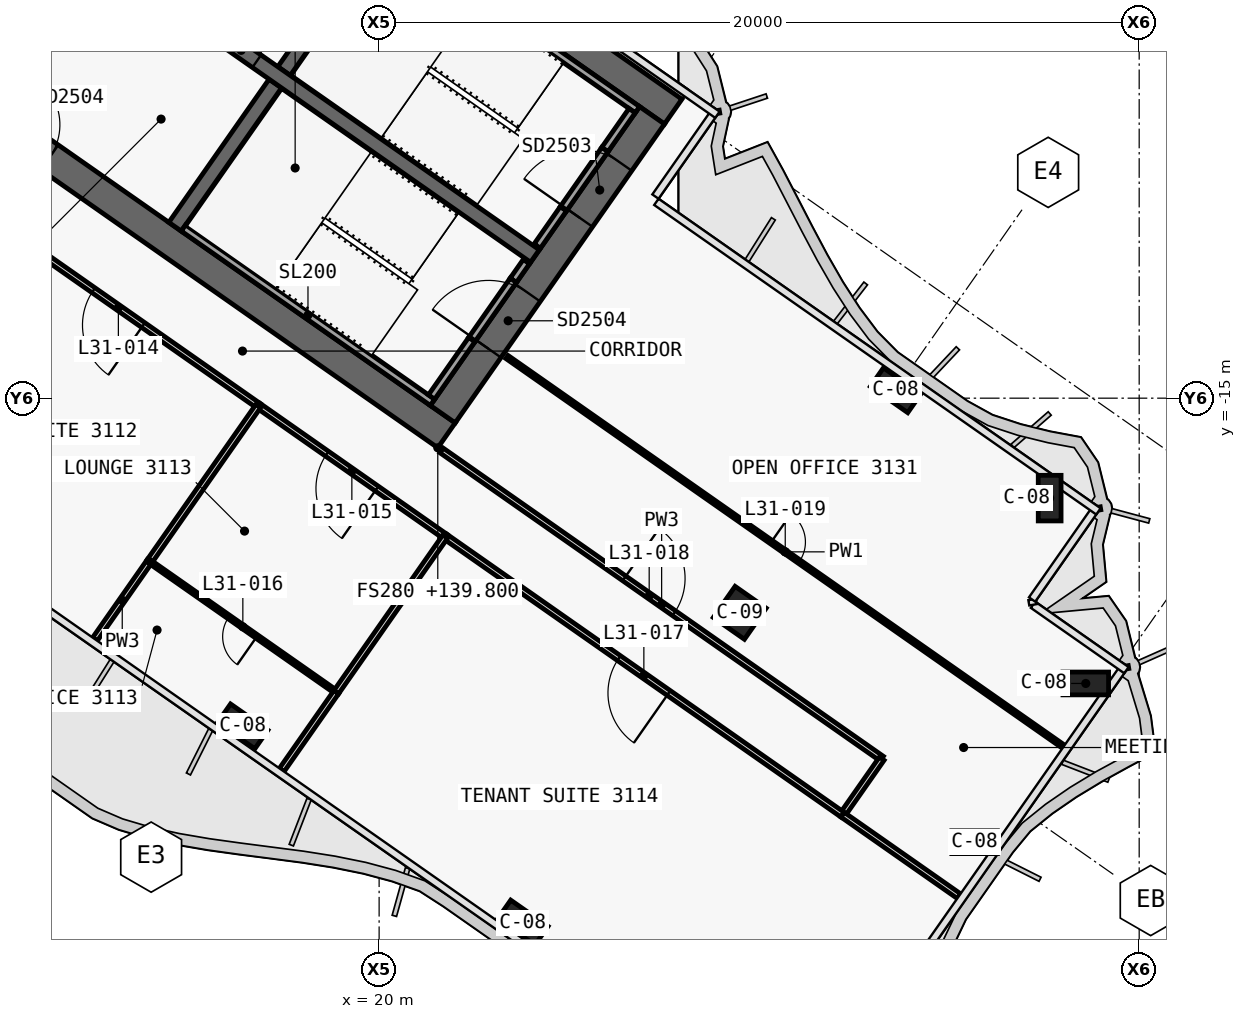
"""IFC4 building model, lengths in metres.
Left out: names, types, materials, properties, quantities, classifications, styles, units other than length and angle.
Written with IfcOpenShell. Run it as: python <this file> out.ifc"""

import sys

from ifc_helpers import new_model, si_unit, direction, frame, frame_2d, origin, origin_2d, place, context, subcontext, project, spatial, polyline, rectangle, outline, extrude, clip, halfspace, element, fill, save


model = new_model("IFC4")
c1 = context("Model", 3, precision=1e-05, world=origin(), true_north=direction((0.0, 1.0)))
c2 = subcontext(c1, "Body", "Model", "MODEL_VIEW")
j1 = project(units=[si_unit("LENGTHUNIT", "METRE"), si_unit("PLANEANGLEUNIT", "RADIAN")], contexts=[c1])
p1 = place(None, origin())
s1 = spatial("IfcSite", under=j1, at=p1, CompositionType="ELEMENT")
p2 = place(p1, origin())
s2 = spatial("IfcBuilding", under=s1, at=p2, CompositionType="ELEMENT")
p3 = place(p2, frame((0.0, 0.0, 139.8)))
s3 = spatial("IfcBuildingStorey", under=s2, at=p3, CompositionType="ELEMENT", Elevation=139.8)
p4 = place(p3, frame((-0.029, 11.984, 0.0), z_axis=(0.0, 0.0, 1.0), x_axis=(0.819151382952, -0.573577380837, 0.0)))
e1 = element("IfcWall", 1, at=p4, inside=s3, PredefinedType="SHEAR", context=c2, shape_type="SweptSolid", body=[
    extrude(outline(polyline([(33.898, 0.4), (-0.0, 0.4), (0.56, -0.4), (33.898, -0.4), (33.898, 0.4)])), origin(), (0.0, 0.0, 1.0), 3.9),
])
p5 = place(p3, frame((-0.029, -0.712, 0.0), z_axis=(0.0, 0.0, 1.0), x_axis=(0.819151758019, -0.573576845187, 0.0)))
e2 = element("IfcWall", 2, at=p5, inside=s3, PredefinedType="SHEAR", context=c2, shape_type="SweptSolid", body=[
    extrude(outline(polyline([(26.616, 0.4), (-0.0, 0.4), (0.56, -0.4), (26.616, -0.4), (26.616, 0.4)])), origin(), (0.0, 0.0, 1.0), 3.9),
])
p6 = place(p5, frame((0.966, 0.0, 0.0)))
e3 = element("IfcOpeningElement", 3, at=p6, cuts=e2, PredefinedType="OPENING", context=c2, shape_type="SweptSolid", body=[
    extrude(rectangle(XDim=1.5, YDim=2.1, at=frame_2d((0.75, 1.05))), frame((0.0, 0.41, 0.0), z_axis=(0.0, -1.0, 0.0), x_axis=(1.0, 0.0, 0.0)), (0.0, 0.0, 1.0), 0.82),
])
p7 = place(p5, frame((12.366, 0.0, 0.0)))
e4 = element("IfcOpeningElement", 4, at=p7, cuts=e2, PredefinedType="OPENING", context=c2, shape_type="SweptSolid", body=[
    extrude(rectangle(XDim=1.5, YDim=2.1, at=frame_2d((0.75, 1.05))), frame((0.0, 0.41, 0.0), z_axis=(0.0, -1.0, 0.0), x_axis=(1.0, 0.0, 0.0)), (0.0, 0.0, 1.0), 0.82),
])
p8 = place(p3, frame((21.675, -15.421, 0.0), z_axis=(0.0, 0.0, 1.0), x_axis=(0.573581815061, 0.819148278049, 0.0)))
e5 = element("IfcWall", 5, at=p8, inside=s3, PredefinedType="SHEAR", context=c2, shape_type="SweptSolid", body=[
    extrude(outline(polyline([(9.6, 0.4), (0.0, 0.4), (0.0, -0.4), (9.6, -0.4), (9.6, 0.4)])), origin(), (0.0, 0.0, 1.0), 3.9),
])
p9 = place(p8, frame((6.3, 0.0, 0.0)))
e6 = element("IfcOpeningElement", 6, at=p9, cuts=e5, PredefinedType="OPENING", context=c2, shape_type="SweptSolid", body=[
    extrude(rectangle(XDim=1.8, YDim=2.1, at=frame_2d((0.9, 1.05))), frame((0.0, 0.41, 0.0), z_axis=(0.0, -1.0, 0.0), x_axis=(1.0, 0.0, 0.0)), (0.0, 0.0, 1.0), 0.82),
])
p10 = place(p8, frame((2.1, 0.0, 0.0)))
e7 = element("IfcOpeningElement", 7, at=p10, cuts=e5, PredefinedType="OPENING", context=c2, shape_type="SweptSolid", body=[
    extrude(rectangle(XDim=1.8, YDim=2.1, at=frame_2d((0.9, 1.05))), frame((0.0, 0.41, 0.0), z_axis=(0.0, -1.0, 0.0), x_axis=(1.0, 0.0, 0.0)), (0.0, 0.0, 1.0), 0.82),
])
p11 = place(p3, frame((14.63, -10.488, 0.0), z_axis=(0.0, 0.0, 1.0), x_axis=(0.573611936273, 0.819127185829, 0.0)))
e8 = element("IfcWall", 8, at=p11, inside=s3, PredefinedType="SHEAR", context=c2, shape_type="SweptSolid", body=[
    extrude(outline(polyline([(0.0, 0.2), (0.0, -0.2), (4.6, -0.2), (4.6, 0.2), (0.0, 0.2)])), origin(), (0.0, 0.0, 1.0), 3.9),
])
p12 = place(p3, frame((17.498, -6.392, 0.0), z_axis=(0.0, 0.0, 1.0), x_axis=(0.573611936273, 0.819127185829, 0.0)))
e9 = element("IfcWall", 9, at=p12, inside=s3, PredefinedType="SHEAR", context=c2, shape_type="SweptSolid", body=[
    extrude(outline(polyline([(4.6, -0.2), (4.6, 0.2), (0.0, 0.2), (0.0, -0.2), (4.6, -0.2)])), origin(), (0.0, 0.0, 1.0), 3.9),
])
p13 = place(p3, frame((2.638, 3.768, 0.0), z_axis=(0.0, 0.0, 1.0), x_axis=(0.81915267502, -0.573575535572, 0.0)))
e10 = element("IfcWall", 10, at=p13, inside=s3, PredefinedType="SHEAR", context=c2, shape_type="SweptSolid", body=[
    extrude(outline(polyline([(0.0, 0.2), (0.0, -0.2), (26.2, -0.2), (26.2, 0.2), (0.0, 0.2)])), origin(), (0.0, 0.0, 1.0), 3.9),
])
p14 = place(p13, frame((9.637, 0.0, 0.0)))
e11 = element("IfcOpeningElement", 11, at=p14, cuts=e10, PredefinedType="OPENING", context=c2, shape_type="SweptSolid", body=[
    extrude(rectangle(XDim=1.2, YDim=2.1, at=frame_2d((0.6, 1.05))), frame((0.0, 0.21, 0.0), z_axis=(0.0, -1.0, 0.0), x_axis=(1.0, 0.0, 0.0)), (0.0, 0.0, 1.0), 0.42),
])
p15 = place(p13, frame((11.812, 0.0, 0.0)))
e12 = element("IfcOpeningElement", 12, at=p15, cuts=e10, PredefinedType="OPENING", context=c2, shape_type="SweptSolid", body=[
    extrude(rectangle(XDim=1.2, YDim=2.1, at=frame_2d((0.6, 1.05))), frame((0.0, 0.21, 0.0), z_axis=(0.0, -1.0, 0.0), x_axis=(1.0, 0.0, 0.0)), (0.0, 0.0, 1.0), 0.42),
])
p16 = place(p13, frame((13.988, 0.0, 0.0)))
e13 = element("IfcOpeningElement", 13, at=p16, cuts=e10, PredefinedType="OPENING", context=c2, shape_type="SweptSolid", body=[
    extrude(rectangle(XDim=1.2, YDim=2.1, at=frame_2d((0.6, 1.05))), frame((0.0, 0.21, 0.0), z_axis=(0.0, -1.0, 0.0), x_axis=(1.0, 0.0, 0.0)), (0.0, 0.0, 1.0), 0.42),
])
p17 = place(p13, frame((16.262, 0.0, 0.0)))
e14 = element("IfcOpeningElement", 14, at=p17, cuts=e10, PredefinedType="OPENING", context=c2, shape_type="SweptSolid", body=[
    extrude(rectangle(XDim=1.0, YDim=2.1, at=frame_2d((0.5, 1.05))), frame((0.0, 0.21, 0.0), z_axis=(0.0, -1.0, 0.0), x_axis=(1.0, 0.0, 0.0)), (0.0, 0.0, 1.0), 0.42),
])
for number, where, z_axis, x_axis in (
    (15, (16.41, -23.637, 0.0), (0.0, 0.0, 1.0), (0.819, -0.574, 0.0)),
    (16, (23.782, -28.799, 0.0), (0.0, 0.0, 1.0), (0.819, -0.574, 0.0)),
    (17, (33.591, -14.792, 0.0), (0.0, 0.0, 1.0), (0.819, -0.574, 0.0)),
):
    element("IfcColumn", number, at=place(p3, frame(where, z_axis=z_axis, x_axis=x_axis)), inside=s3, PredefinedType="COLUMN", context=c2, shape_type="SweptSolid", body=[
        extrude(rectangle(XDim=1.2, YDim=0.6, at=origin_2d()), origin(), (0.0, 0.0, 1.0), 3.9),
    ])
p18 = place(p3, frame((37.85, -17.774, 0.0), z_axis=(-0.477736700756, 0.334521041728, 0.812319713778), x_axis=(0.665409295045, -0.465933243566, 0.583212382077)))
e18 = element("IfcColumn", 18, at=p18, inside=s3, PredefinedType="COLUMN", context=c2, shape_type="Clipping", body=[
    clip(clip(extrude(rectangle(XDim=1.2, YDim=0.6, at=origin_2d()), origin(), (0.0, 0.0, 1.0), 4.801), halfspace(frame((0.0, 0.0, 0.431), z_axis=(0.0, 0.0, 1.0), x_axis=(1.0, 0.0, 0.0)), True)), halfspace(frame((0.0, 0.0, 4.37), z_axis=(0.0, 0.0, 1.0), x_axis=(1.0, 0.0, 0.0)), False)),
])
p19 = place(p3, frame((32.847, -30.935, 0.0), z_axis=(-0.477726386634, 0.334536966807, 0.812319221337), x_axis=(0.573610203854, 0.819128398991, 0.0)))
e19 = element("IfcColumn", 19, at=p19, inside=s3, PredefinedType="COLUMN", context=c2, shape_type="Clipping", body=[
    clip(clip(extrude(rectangle(XDim=1.2, YDim=0.6, at=origin_2d()), origin(), (0.0, 0.0, 1.0), 4.801), halfspace(frame((0.0, 0.0, 0.215), z_axis=(0.0, 0.0, 1.0), x_axis=(1.0, 0.0, 0.0)), True)), halfspace(frame((0.0, 0.0, 4.585), z_axis=(0.0, 0.0, 1.0), x_axis=(1.0, 0.0, 0.0)), False)),
])
p20 = place(p3, frame((35.772, -26.757, 0.0), z_axis=(-0.477760573022, 0.334577651055, 0.812282358715), x_axis=(0.573629466203, 0.819114909829, 0.0)))
e20 = element("IfcColumn", 20, at=p20, inside=s3, PredefinedType="COLUMN", context=c2, shape_type="Clipping", body=[
    clip(clip(extrude(rectangle(XDim=1.2, YDim=0.6, at=origin_2d()), origin(), (0.0, 0.0, 1.0), 4.801), halfspace(frame((0.0, 0.0, 0.215), z_axis=(0.0, 0.0, 1.0), x_axis=(1.0, 0.0, 0.0)), True)), halfspace(frame((0.0, 0.0, 4.585), z_axis=(0.0, 0.0, 1.0), x_axis=(1.0, 0.0, 0.0)), False)),
])
p21 = place(p3, frame((38.698, -22.579, 0.0), z_axis=(-0.477769502493, 0.334528037995, 0.812297540488), x_axis=(0.573565197047, 0.819159914019, 0.0)))
e21 = element("IfcColumn", 21, at=p21, inside=s3, PredefinedType="COLUMN", context=c2, shape_type="Clipping", body=[
    clip(clip(extrude(rectangle(XDim=1.2, YDim=0.6, at=origin_2d()), origin(), (0.0, 0.0, 1.0), 4.801), halfspace(frame((0.0, 0.0, 0.215), z_axis=(0.0, 0.0, 1.0), x_axis=(1.0, 0.0, 0.0)), True)), halfspace(frame((0.0, 0.0, 4.585), z_axis=(0.0, 0.0, 1.0), x_axis=(1.0, 0.0, 0.0)), False)),
])
p22 = place(p3, frame((29.49, -20.649, 0.0), z_axis=(0.0, 0.0, 1.0), x_axis=(0.819152044289, -0.573576436351, 0.0)))
e22 = element("IfcColumn", 22, at=p22, inside=s3, PredefinedType="COLUMN", context=c2, shape_type="SweptSolid", body=[
    extrude(rectangle(XDim=1.0, YDim=1.0, at=origin_2d()), origin(), (0.0, 0.0, 1.0), 3.9),
])
p23 = place(p3, frame((20.243, -2.821, 0.0), z_axis=(0.0, 0.0, 1.0), x_axis=(0.819141584393, -0.57359137434, 0.0)))
e23 = element("IfcWall", 23, at=p23, inside=s3, PredefinedType="SOLIDWALL", context=c2, shape_type="SweptSolid", body=[
    extrude(rectangle(XDim=8.0, YDim=0.2, at=frame_2d((4.0, 0.0))), origin(), (0.0, 0.0, 1.0), 3.62),
])
p24 = place(p3, frame((24.162, -10.998, 0.0), z_axis=(0.0, 0.0, 1.0), x_axis=(0.573612502218, 0.819126789514, 0.0)))
e24 = element("IfcWall", 24, at=p24, inside=s3, PredefinedType="SOLIDWALL", context=c2, shape_type="SweptSolid", body=[
    extrude(rectangle(XDim=1.2, YDim=0.2, at=frame_2d((0.6, 0.0))), origin(), (0.0, 0.0, 1.0), 3.62),
])
p25 = place(p3, frame((25.94, -8.458, 0.0), z_axis=(0.0, 0.0, 1.0), x_axis=(0.573619628835, 0.819121798889, 0.0)))
e25 = element("IfcWall", 25, at=p25, inside=s3, PredefinedType="SOLIDWALL", context=c2, shape_type="SweptSolid", body=[
    extrude(rectangle(XDim=1.25, YDim=0.2, at=frame_2d((0.625, 0.0))), origin(), (0.0, 0.0, 1.0), 3.62),
])
p26 = place(p3, frame((24.85, -10.014, 2.15), z_axis=(0.0, 0.0, 1.0), x_axis=(0.573505465124, 0.819201734296, 0.0)))
e26 = element("IfcWall", 26, at=p26, inside=s3, PredefinedType="SOLIDWALL", context=c2, shape_type="SweptSolid", body=[
    extrude(rectangle(XDim=1.9, YDim=0.2, at=frame_2d((0.95, 0.0))), origin(), (0.0, 0.0, 1.0), 1.47),
])
p27 = place(p3, frame((14.851, -10.521, 0.0), z_axis=(0.0, 0.0, 1.0), x_axis=(0.819141584393, -0.57359137434, 0.0)))
e27 = element("IfcWall", 27, at=p27, inside=s3, PredefinedType="SOLIDWALL", context=c2, shape_type="SweptSolid", body=[
    extrude(rectangle(XDim=8.0, YDim=0.2, at=frame_2d((4.0, 0.0))), origin(), (0.0, 0.0, 1.0), 3.62),
])
p28 = place(p3, frame((21.38, -14.97, 0.0), z_axis=(0.0, 0.0, 1.0), x_axis=(0.573559770908, 0.819163713305, 0.0)))
e28 = element("IfcWall", 28, at=p28, inside=s3, PredefinedType="SOLIDWALL", context=c2, shape_type="SweptSolid", body=[
    extrude(rectangle(XDim=1.85, YDim=0.2, at=frame_2d((0.925, 0.0))), origin(), (0.0, 0.0, 1.0), 3.62),
])
p29 = place(p3, frame((23.531, -11.898, 0.0), z_axis=(0.0, 0.0, 1.0), x_axis=(0.573708088123, 0.819059844958, 0.0)))
e29 = element("IfcWall", 29, at=p29, inside=s3, PredefinedType="SOLIDWALL", context=c2, shape_type="SweptSolid", body=[
    extrude(rectangle(XDim=0.6, YDim=0.2, at=frame_2d((0.3, 0.0))), origin(), (0.0, 0.0, 1.0), 3.62),
])
p30 = place(p3, frame((22.441, -13.455, 2.15), z_axis=(0.0, 0.0, 1.0), x_axis=(0.573591692345, 0.819141361715, 0.0)))
e30 = element("IfcWall", 30, at=p30, inside=s3, PredefinedType="SOLIDWALL", context=c2, shape_type="SweptSolid", body=[
    extrude(rectangle(XDim=1.9, YDim=0.2, at=frame_2d((0.95, 0.0))), origin(), (0.0, 0.0, 1.0), 1.47),
])
p31 = place(p3, frame((21.642, -16.375, 0.0), z_axis=(0.0, 0.0, 1.0), x_axis=(0.819150808859, -0.573578200724, 0.0)))
e31 = element("IfcWall", 31, at=p31, inside=s3, PredefinedType="PARTITIONING", context=c2, shape_type="SweptSolid", body=[
    extrude(rectangle(XDim=14.142, YDim=0.15, at=frame_2d((7.071, 0.0))), origin(), (0.0, 0.0, 1.0), 3.0),
])
p32 = place(p31, frame((5.871, 0.0, 0.0)))
e32 = element("IfcOpeningElement", 32, at=p32, cuts=e31, PredefinedType="OPENING", context=c2, shape_type="SweptSolid", body=[
    extrude(rectangle(XDim=1.6, YDim=2.1, at=frame_2d((0.8, 1.05))), frame((0.0, 0.085, 0.0), z_axis=(0.0, -1.0, 0.0), x_axis=(1.0, 0.0, 0.0)), (0.0, 0.0, 1.0), 0.17),
])
p33 = place(p3, frame((33.226, -24.486, 0.0), z_axis=(0.0, 0.0, 1.0), x_axis=(-0.573553363558, -0.819168199548, 0.0)))
e33 = element("IfcWall", 33, at=p33, inside=s3, PredefinedType="PARTITIONING", context=c2, shape_type="SweptSolid", body=[
    extrude(rectangle(XDim=1.8, YDim=0.15, at=frame_2d((0.9, 0.0))), origin(), (0.0, 0.0, 1.0), 3.0),
])
p34 = place(p3, frame((16.826, -15.2, 0.0), z_axis=(0.0, 0.0, 1.0), x_axis=(-0.819155480642, 0.5735715287, 0.0)))
e34 = element("IfcWall", 34, at=p34, inside=s3, PredefinedType="PARTITIONING", context=c2, shape_type="SweptSolid", body=[
    extrude(rectangle(XDim=9.004, YDim=0.15, at=frame_2d((4.502, 0.0))), origin(), (0.0, 0.0, 1.0), 3.0),
])
p35 = place(p34, frame((3.702, 0.0, 0.0)))
e35 = element("IfcOpeningElement", 35, at=p35, cuts=e34, PredefinedType="OPENING", context=c2, shape_type="SweptSolid", body=[
    extrude(rectangle(XDim=1.6, YDim=2.1, at=frame_2d((0.8, 1.05))), frame((0.0, 0.085, 0.0), z_axis=(0.0, -1.0, 0.0), x_axis=(1.0, 0.0, 0.0)), (0.0, 0.0, 1.0), 0.17),
])
p36 = place(p3, frame((21.741, -18.642, 0.0), z_axis=(0.0, 0.0, 1.0), x_axis=(-0.819165052243, 0.573557858619, 0.0)))
e36 = element("IfcWall", 36, at=p36, inside=s3, PredefinedType="PARTITIONING", context=c2, shape_type="SweptSolid", body=[
    extrude(rectangle(XDim=6.004, YDim=0.15, at=frame_2d((3.002, 0.0))), origin(), (0.0, 0.0, 1.0), 3.0),
])
p37 = place(p36, frame((2.202, 0.0, 0.0)))
e37 = element("IfcOpeningElement", 37, at=p37, cuts=e36, PredefinedType="OPENING", context=c2, shape_type="SweptSolid", body=[
    extrude(rectangle(XDim=1.6, YDim=2.1, at=frame_2d((0.8, 1.05))), frame((0.0, 0.085, 0.0), z_axis=(0.0, -1.0, 0.0), x_axis=(1.0, 0.0, 0.0)), (0.0, 0.0, 1.0), 0.17),
])
p38 = place(p3, frame((32.194, -25.961, 0.0), z_axis=(0.0, 0.0, 1.0), x_axis=(-0.819143848461, 0.573588141028, 0.0)))
e38 = element("IfcWall", 38, at=p38, inside=s3, PredefinedType="PARTITIONING", context=c2, shape_type="SweptSolid", body=[
    extrude(rectangle(XDim=12.764, YDim=0.15, at=frame_2d((6.382, 0.0))), origin(), (0.0, 0.0, 1.0), 3.0),
])
p39 = place(p38, frame((5.582, 0.0, 0.0)))
e39 = element("IfcOpeningElement", 39, at=p39, cuts=e38, PredefinedType="OPENING", context=c2, shape_type="SweptSolid", body=[
    extrude(rectangle(XDim=1.6, YDim=2.1, at=frame_2d((0.8, 1.05))), frame((0.0, 0.085, 0.0), z_axis=(0.0, -1.0, 0.0), x_axis=(1.0, 0.0, 0.0)), (0.0, 0.0, 1.0), 0.17),
])
p40 = place(p3, frame((23.363, -13.916, 0.0), z_axis=(0.0, 0.0, 1.0), x_axis=(0.819151086028, -0.573577804887, 0.0)))
e40 = element("IfcWall", 40, at=p40, inside=s3, PredefinedType="PARTITIONING", context=c2, shape_type="SweptSolid", body=[
    extrude(rectangle(XDim=17.88, YDim=0.1, at=frame_2d((8.94, 0.0))), origin(), (0.0, 0.0, 1.0), 2.9),
])
p41 = place(p40, frame((8.49, 0.0, 0.0)))
e41 = element("IfcOpeningElement", 41, at=p41, cuts=e40, PredefinedType="OPENING", context=c2, shape_type="SweptSolid", body=[
    extrude(rectangle(XDim=0.9, YDim=2.1, at=frame_2d((0.45, 1.05))), frame((0.0, 0.06, 0.0), z_axis=(0.0, -1.0, 0.0), x_axis=(1.0, 0.0, 0.0)), (0.0, 0.0, 1.0), 0.12),
])
p42 = place(p3, frame((35.256, -28.104, 0.0), z_axis=(0.0, 0.0, 1.0), x_axis=(-0.819213508421, 0.573488646462, 0.0)))
e42 = element("IfcWall", 42, at=p42, inside=s3, PredefinedType="PARTITIONING", context=c2, shape_type="SweptSolid", body=[
    extrude(rectangle(XDim=3.738, YDim=0.15, at=frame_2d((1.869, 0.0))), origin(), (0.0, 0.0, 1.0), 2.9),
])
p43 = place(p3, frame((13.958, -19.294, 0.0), z_axis=(0.0, 0.0, 1.0), x_axis=(-0.573501652684, -0.819204403289, 0.0)))
e43 = element("IfcWall", 43, at=p43, inside=s3, PredefinedType="PARTITIONING", context=c2, shape_type="SweptSolid", body=[
    extrude(rectangle(XDim=2.501, YDim=0.15, at=frame_2d((1.25, 0.0))), origin(), (0.0, 0.0, 1.0), 2.9),
])
p44 = place(p3, frame((16.825, -15.199, 0.0), z_axis=(0.0, 0.0, 1.0), x_axis=(-0.573613022702, -0.819126425033, 0.0)))
e44 = element("IfcWall", 44, at=p44, inside=s3, PredefinedType="PARTITIONING", context=c2, shape_type="SweptSolid", body=[
    extrude(rectangle(XDim=5.002, YDim=0.15, at=frame_2d((2.501, 0.0))), origin(), (0.0, 0.0, 1.0), 3.62),
])
p45 = place(p3, frame((18.871, -22.737, 0.0), z_axis=(0.0, 0.0, 1.0), x_axis=(-0.819149710902, 0.573579768758, 0.0)))
e45 = element("IfcWall", 45, at=p45, inside=s3, PredefinedType="PARTITIONING", context=c2, shape_type="SweptSolid", body=[
    extrude(rectangle(XDim=6.0, YDim=0.1, at=frame_2d((3.0, 0.0))), origin(), (0.0, 0.0, 1.0), 3.0),
])
p46 = place(p45, frame((2.55, 0.0, 0.0)))
e46 = element("IfcOpeningElement", 46, at=p46, cuts=e45, PredefinedType="OPENING", context=c2, shape_type="SweptSolid", body=[
    extrude(rectangle(XDim=0.9, YDim=2.1, at=frame_2d((0.45, 1.05))), frame((0.0, 0.06, 0.0), z_axis=(0.0, -1.0, 0.0), x_axis=(1.0, 0.0, 0.0)), (0.0, 0.0, 1.0), 0.12),
])
p47 = place(p3, frame((18.871, -22.737, 0.0), z_axis=(0.0, 0.0, 1.0), x_axis=(-0.573560689761, -0.819163069945, 0.0)))
e47 = element("IfcWall", 47, at=p47, inside=s3, PredefinedType="PARTITIONING", context=c2, shape_type="SweptSolid", body=[
    extrude(rectangle(XDim=2.499, YDim=0.15, at=frame_2d((1.25, 0.0))), origin(), (0.0, 0.0, 1.0), 2.9),
])
p48 = place(p3, frame((21.74, -18.641, 0.0), z_axis=(0.0, 0.0, 1.0), x_axis=(-0.573586866468, -0.819144740944, 0.0)))
e48 = element("IfcWall", 48, at=p48, inside=s3, PredefinedType="PARTITIONING", context=c2, shape_type="SweptSolid", body=[
    extrude(rectangle(XDim=5.0, YDim=0.15, at=frame_2d((2.5, 0.0))), origin(), (0.0, 0.0, 1.0), 3.62),
])
p49 = place(p17, origin())
e49 = element("IfcDoor", 49, at=p49, inside=s3, OperationType="SINGLE_SWING_RIGHT", PredefinedType="DOOR", context=c2, shape_type="SweptSolid", body=[
    extrude(rectangle(XDim=1.0, YDim=2.1, at=frame_2d((0.5, 1.05))), frame((0.0, 0.025, 0.0), z_axis=(0.0, -1.0, 0.0), x_axis=(1.0, 0.0, 0.0)), (0.0, 0.0, 1.0), 0.05),
])
fill(e14, e49)
p50 = place(p9, origin())
e50 = element("IfcDoor", 50, at=p50, inside=s3, OperationType="DOUBLE_DOOR_SINGLE_SWING", PredefinedType="DOOR", context=c2, shape_type="SweptSolid", body=[
    extrude(rectangle(XDim=1.8, YDim=2.1, at=frame_2d((0.9, 1.05))), frame((0.0, 0.025, 0.0), z_axis=(0.0, -1.0, 0.0), x_axis=(1.0, 0.0, 0.0)), (0.0, 0.0, 1.0), 0.05),
])
fill(e6, e50)
p51 = place(p10, origin())
e51 = element("IfcDoor", 51, at=p51, inside=s3, OperationType="DOUBLE_DOOR_SINGLE_SWING", PredefinedType="DOOR", context=c2, shape_type="SweptSolid", body=[
    extrude(rectangle(XDim=1.8, YDim=2.1, at=frame_2d((0.9, 1.05))), frame((0.0, 0.025, 0.0), z_axis=(0.0, -1.0, 0.0), x_axis=(1.0, 0.0, 0.0)), (0.0, 0.0, 1.0), 0.05),
])
fill(e7, e51)
p52 = place(p35, origin())
e52 = element("IfcDoor", 52, at=p52, inside=s3, OperationType="DOUBLE_DOOR_SINGLE_SWING", PredefinedType="DOOR", context=c2, shape_type="SweptSolid", body=[
    extrude(rectangle(XDim=1.6, YDim=2.1, at=frame_2d((0.8, 1.05))), frame((0.0, 0.025, 0.0), z_axis=(0.0, -1.0, 0.0), x_axis=(1.0, 0.0, 0.0)), (0.0, 0.0, 1.0), 0.05),
])
fill(e35, e52)
p53 = place(p37, origin())
e53 = element("IfcDoor", 53, at=p53, inside=s3, OperationType="DOUBLE_DOOR_SINGLE_SWING", PredefinedType="DOOR", context=c2, shape_type="SweptSolid", body=[
    extrude(rectangle(XDim=1.6, YDim=2.1, at=frame_2d((0.8, 1.05))), frame((0.0, 0.025, 0.0), z_axis=(0.0, -1.0, 0.0), x_axis=(1.0, 0.0, 0.0)), (0.0, 0.0, 1.0), 0.05),
])
fill(e37, e53)
p54 = place(p46, origin())
e54 = element("IfcDoor", 54, at=p54, inside=s3, OperationType="SINGLE_SWING_RIGHT", PredefinedType="DOOR", context=c2, shape_type="SweptSolid", body=[
    extrude(rectangle(XDim=0.9, YDim=2.1, at=frame_2d((0.45, 1.05))), frame((0.0, 0.025, 0.0), z_axis=(0.0, -1.0, 0.0), x_axis=(1.0, 0.0, 0.0)), (0.0, 0.0, 1.0), 0.05),
])
fill(e46, e54)
p55 = place(p39, origin())
e55 = element("IfcDoor", 55, at=p55, inside=s3, OperationType="DOUBLE_DOOR_SINGLE_SWING", PredefinedType="DOOR", context=c2, shape_type="SweptSolid", body=[
    extrude(rectangle(XDim=1.6, YDim=2.1, at=frame_2d((0.8, 1.05))), frame((0.0, 0.025, 0.0), z_axis=(0.0, -1.0, 0.0), x_axis=(1.0, 0.0, 0.0)), (0.0, 0.0, 1.0), 0.05),
])
fill(e39, e55)
p56 = place(p32, origin())
e56 = element("IfcDoor", 56, at=p56, inside=s3, OperationType="DOUBLE_DOOR_SINGLE_SWING", PredefinedType="DOOR", context=c2, shape_type="SweptSolid", body=[
    extrude(rectangle(XDim=1.6, YDim=2.1, at=frame_2d((0.8, 1.05))), frame((0.0, 0.025, 0.0), z_axis=(0.0, -1.0, 0.0), x_axis=(1.0, 0.0, 0.0)), (0.0, 0.0, 1.0), 0.05),
])
fill(e32, e56)
p57 = place(p41, origin())
e57 = element("IfcDoor", 57, at=p57, inside=s3, OperationType="SINGLE_SWING_RIGHT", PredefinedType="DOOR", context=c2, shape_type="SweptSolid", body=[
    extrude(rectangle(XDim=0.9, YDim=2.1, at=frame_2d((0.45, 1.05))), frame((0.0, 0.025, 0.0), z_axis=(0.0, -1.0, 0.0), x_axis=(1.0, 0.0, 0.0)), (0.0, 0.0, 1.0), 0.05),
])
fill(e41, e57)
save(model, sys.argv[1])
